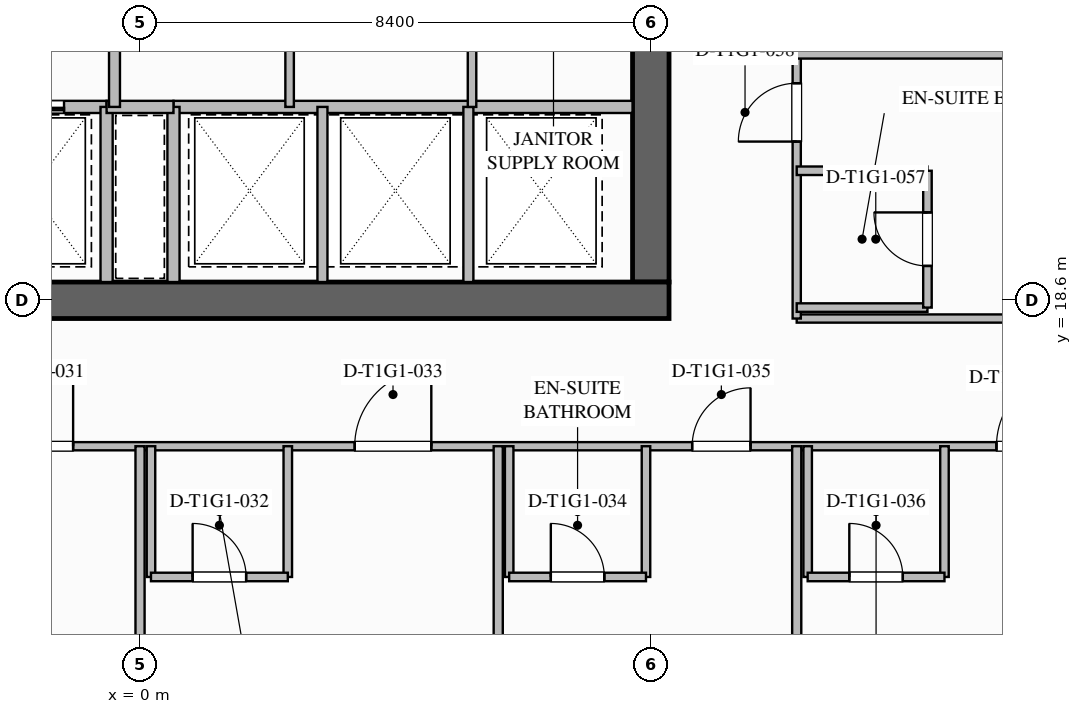
"""IFC4 building model, lengths in metres.
Left out: names, types, materials, properties, quantities, classifications, styles, units other than length and angle.
Written with IfcOpenShell. Run it as: python <this file> out.ifc"""

import sys

from ifc_helpers import new_model, si_unit, direction, frame, frame_2d, origin, place, context, subcontext, project, spatial, rectangle, extrude, element, fill, save


model = new_model("IFC4")
c1 = context("Model", 3, precision=1e-05, world=origin(), true_north=direction((0.0, 1.0)))
c2 = subcontext(c1, "Body", "Model", "MODEL_VIEW")
j1 = project(units=[si_unit("LENGTHUNIT", "METRE"), si_unit("PLANEANGLEUNIT", "RADIAN")], contexts=[c1])
p1 = place(None, origin())
s1 = spatial("IfcSite", under=j1, at=p1, CompositionType="ELEMENT")
p2 = place(p1, origin())
s2 = spatial("IfcBuilding", under=s1, at=p2, CompositionType="ELEMENT")
p3 = place(p2, frame((0.0, 0.0, 33.2)))
s3 = spatial("IfcBuildingStorey", under=s2, at=p3, CompositionType="ELEMENT", Elevation=33.2)
p4 = place(p3, frame((8.4, 35.1, 0.0), z_axis=(0.0, 0.0, 1.0), x_axis=(0.0, -1.0, 0.0)))
e1 = element("IfcWall", 1, at=p4, inside=s3, PredefinedType="SHEAR", context=c2, shape_type="SweptSolid", body=[
    extrude(rectangle(XDim=16.2, YDim=0.6, at=frame_2d((8.1, 0.0))), origin(), (0.0, 0.0, 1.0), 3.5),
])
p5 = place(p4, frame((3.08, 0.0, 0.0)))
e2 = element("IfcOpeningElement", 2, at=p5, cuts=e1, PredefinedType="OPENING", context=c2, shape_type="SweptSolid", body=[
    extrude(rectangle(XDim=1.12, YDim=2.1, at=frame_2d((0.56, 1.05))), frame((0.0, 0.31, 0.0), z_axis=(0.0, -1.0, 0.0), x_axis=(1.0, 0.0, 0.0)), (0.0, 0.0, 1.0), 0.62),
])
p6 = place(p3, frame((8.7, 18.6, 0.0), z_axis=(0.0, 0.0, 1.0), x_axis=(-1.0, 0.0, 0.0)))
e3 = element("IfcWall", 3, at=p6, inside=s3, PredefinedType="SHEAR", context=c2, shape_type="SweptSolid", body=[
    extrude(rectangle(XDim=17.4, YDim=0.6, at=frame_2d((8.7, 0.0))), origin(), (0.0, 0.0, 1.0), 3.5),
])
p7 = place(p3, frame((-0.55, 21.78, 0.0), z_axis=(0.0, 0.0, 1.0), x_axis=(-1.0, 0.0, 0.0)))
e4 = element("IfcWall", 4, at=p7, inside=s3, PredefinedType="SOLIDWALL", context=c2, shape_type="SweptSolid", body=[
    extrude(rectangle(XDim=7.55, YDim=0.2, at=frame_2d((3.775, 0.0))), origin(), (0.0, 0.0, 1.0), 3.24),
])
p8 = place(p7, frame((5.5, 0.0, 0.0)))
e5 = element("IfcOpeningElement", 5, at=p8, cuts=e4, PredefinedType="OPENING", context=c2, shape_type="SweptSolid", body=[
    extrude(rectangle(XDim=1.1, YDim=2.2, at=frame_2d((0.55, 1.1))), frame((0.0, 0.11, 0.0), z_axis=(0.0, -1.0, 0.0), x_axis=(1.0, 0.0, 0.0)), (0.0, 0.0, 1.0), 0.22),
])
p9 = place(p7, frame((3.1, 0.0, 0.0)))
e6 = element("IfcOpeningElement", 6, at=p9, cuts=e4, PredefinedType="OPENING", context=c2, shape_type="SweptSolid", body=[
    extrude(rectangle(XDim=1.1, YDim=2.2, at=frame_2d((0.55, 1.1))), frame((0.0, 0.11, 0.0), z_axis=(0.0, -1.0, 0.0), x_axis=(1.0, 0.0, 0.0)), (0.0, 0.0, 1.0), 0.22),
])
p10 = place(p7, frame((0.7, 0.0, 0.0)))
e7 = element("IfcOpeningElement", 7, at=p10, cuts=e4, PredefinedType="OPENING", context=c2, shape_type="SweptSolid", body=[
    extrude(rectangle(XDim=1.1, YDim=2.2, at=frame_2d((0.55, 1.1))), frame((0.0, 0.11, 0.0), z_axis=(0.0, -1.0, 0.0), x_axis=(1.0, 0.0, 0.0)), (0.0, 0.0, 1.0), 0.22),
])
p11 = place(p3, frame((-0.55, 18.9, 0.0), z_axis=(0.0, 0.0, 1.0), x_axis=(0.0, 1.0, 0.0)))
e8 = element("IfcWall", 8, at=p11, inside=s3, PredefinedType="SOLIDWALL", context=c2, shape_type="SweptSolid", body=[
    extrude(rectangle(XDim=2.88, YDim=0.2, at=frame_2d((1.44, 0.0))), origin(), (0.0, 0.0, 1.0), 3.24),
])
p12 = place(p3, frame((8.1, 21.78, 0.0), z_axis=(0.0, 0.0, 1.0), x_axis=(-1.0, 0.0, 0.0)))
e9 = element("IfcWall", 9, at=p12, inside=s3, PredefinedType="SOLIDWALL", context=c2, shape_type="SweptSolid", body=[
    extrude(rectangle(XDim=7.55, YDim=0.2, at=frame_2d((3.775, 0.0))), origin(), (0.0, 0.0, 1.0), 3.24),
])
p13 = place(p3, frame((0.55, 18.9, 0.0), z_axis=(0.0, 0.0, 1.0), x_axis=(0.0, 1.0, 0.0)))
e10 = element("IfcWall", 10, at=p13, inside=s3, PredefinedType="SOLIDWALL", context=c2, shape_type="SweptSolid", body=[
    extrude(rectangle(XDim=2.88, YDim=0.2, at=frame_2d((1.44, 0.0))), origin(), (0.0, 0.0, 1.0), 3.24),
])
for number, where, z_axis, x_axis in (
    (11, (3.0, 18.9, 0.0), (0.0, 0.0, 1.0), (0.0, 1.0, 0.0)),
    (12, (5.4, 18.9, 0.0), (0.0, 0.0, 1.0), (0.0, 1.0, 0.0)),
):
    element("IfcWall", number, at=place(p3, frame(where, z_axis=z_axis, x_axis=x_axis)), inside=s3, PredefinedType="PARTITIONING", context=c2, shape_type="SweptSolid", body=[
        extrude(rectangle(XDim=2.88, YDim=0.165, at=frame_2d((1.44, 0.0))), origin(), (0.0, 0.0, 1.0), 3.24),
    ])
p14 = place(p3, frame((-0.55, 21.78, 0.0), z_axis=(0.0, 0.0, 1.0), x_axis=(1.0, 0.0, 0.0)))
e13 = element("IfcWall", 13, at=p14, inside=s3, PredefinedType="SOLIDWALL", context=c2, shape_type="SweptSolid", body=[
    extrude(rectangle(XDim=1.1, YDim=0.2, at=frame_2d((0.55, 0.0))), origin(), (0.0, 0.0, 1.0), 3.24),
])
p15 = place(p3, frame((-0.42, 21.78, 0.0), z_axis=(0.0, 0.0, 1.0), x_axis=(0.0, 1.0, 0.0)))
e14 = element("IfcWall", 14, at=p15, inside=s3, PredefinedType="SOLIDWALL", context=c2, shape_type="SweptSolid", body=[
    extrude(rectangle(XDim=3.26, YDim=0.18, at=frame_2d((1.63, 0.0))), origin(), (0.0, 0.0, 1.0), 3.24),
])
p16 = place(p15, frame((1.1, 0.0, 0.0)))
e15 = element("IfcOpeningElement", 15, at=p16, cuts=e14, PredefinedType="OPENING", context=c2, shape_type="SweptSolid", body=[
    extrude(rectangle(XDim=1.0, YDim=2.1, at=frame_2d((0.5, 1.05))), frame((0.0, 0.1, 0.0), z_axis=(0.0, -1.0, 0.0), x_axis=(1.0, 0.0, 0.0)), (0.0, 0.0, 1.0), 0.2),
])
p17 = place(p3, frame((2.46, 21.78, 0.0), z_axis=(0.0, 0.0, 1.0), x_axis=(0.0, 1.0, 0.0)))
e16 = element("IfcWall", 16, at=p17, inside=s3, PredefinedType="PLUMBINGWALL", context=c2, shape_type="SweptSolid", body=[
    extrude(rectangle(XDim=3.26, YDim=0.14, at=frame_2d((1.63, 0.0))), origin(), (0.0, 0.0, 1.0), 3.24),
])
p18 = place(p17, frame((1.0, 0.0, 0.0)))
e17 = element("IfcOpeningElement", 17, at=p18, cuts=e16, PredefinedType="OPENING", context=c2, shape_type="SweptSolid", body=[
    extrude(rectangle(XDim=0.92, YDim=2.1, at=frame_2d((0.46, 1.05))), frame((0.0, 0.08, 0.0), z_axis=(0.0, -1.0, 0.0), x_axis=(1.0, 0.0, 0.0)), (0.0, 0.0, 1.0), 0.16),
])
p19 = place(p3, frame((5.46, 21.78, 0.0), z_axis=(0.0, 0.0, 1.0), x_axis=(0.0, 1.0, 0.0)))
e18 = element("IfcWall", 18, at=p19, inside=s3, PredefinedType="PLUMBINGWALL", context=c2, shape_type="SweptSolid", body=[
    extrude(rectangle(XDim=3.26, YDim=0.14, at=frame_2d((1.63, 0.0))), origin(), (0.0, 0.0, 1.0), 3.24),
])
p20 = place(p19, frame((1.0, 0.0, 0.0)))
e19 = element("IfcOpeningElement", 19, at=p20, cuts=e18, PredefinedType="OPENING", context=c2, shape_type="SweptSolid", body=[
    extrude(rectangle(XDim=0.92, YDim=2.1, at=frame_2d((0.46, 1.05))), frame((0.0, 0.08, 0.0), z_axis=(0.0, -1.0, 0.0), x_axis=(1.0, 0.0, 0.0)), (0.0, 0.0, 1.0), 0.16),
])
p21 = place(p3, frame((-16.2, 16.2, 0.0), z_axis=(0.0, 0.0, 1.0), x_axis=(1.0, 0.0, 0.0)))
e20 = element("IfcWall", 20, at=p21, inside=s3, PredefinedType="PARTITIONING", context=c2, shape_type="SweptSolid", body=[
    extrude(rectangle(XDim=32.4, YDim=0.135, at=frame_2d((16.2, 0.0))), origin(), (0.0, 0.0, 1.0), 3.24),
])
p22 = place(p21, frame((3.285, 0.0, 0.0)))
e21 = element("IfcOpeningElement", 21, at=p22, cuts=e20, PredefinedType="OPENING", context=c2, shape_type="SweptSolid", body=[
    extrude(rectangle(XDim=1.26, YDim=2.2, at=frame_2d((0.63, 1.1))), frame((0.0, 0.077, 0.0), z_axis=(0.0, -1.0, 0.0), x_axis=(1.0, 0.0, 0.0)), (0.0, 0.0, 1.0), 0.155),
])
p23 = place(p21, frame((8.59, 0.0, 0.0)))
e22 = element("IfcOpeningElement", 22, at=p23, cuts=e20, PredefinedType="OPENING", context=c2, shape_type="SweptSolid", body=[
    extrude(rectangle(XDim=0.96, YDim=2.15, at=frame_2d((0.48, 1.075))), frame((0.0, 0.077, 0.0), z_axis=(0.0, -1.0, 0.0), x_axis=(1.0, 0.0, 0.0)), (0.0, 0.0, 1.0), 0.155),
])
p24 = place(p21, frame((13.84, 0.0, 0.0)))
e23 = element("IfcOpeningElement", 23, at=p24, cuts=e20, PredefinedType="OPENING", context=c2, shape_type="SweptSolid", body=[
    extrude(rectangle(XDim=1.26, YDim=2.2, at=frame_2d((0.63, 1.1))), frame((0.0, 0.077, 0.0), z_axis=(0.0, -1.0, 0.0), x_axis=(1.0, 0.0, 0.0)), (0.0, 0.0, 1.0), 0.155),
])
p25 = place(p21, frame((19.73, 0.0, 0.0)))
e24 = element("IfcOpeningElement", 24, at=p25, cuts=e20, PredefinedType="OPENING", context=c2, shape_type="SweptSolid", body=[
    extrude(rectangle(XDim=1.26, YDim=2.2, at=frame_2d((0.63, 1.1))), frame((0.0, 0.077, 0.0), z_axis=(0.0, -1.0, 0.0), x_axis=(1.0, 0.0, 0.0)), (0.0, 0.0, 1.0), 0.155),
])
p26 = place(p21, frame((25.281, 0.0, 0.0)))
e25 = element("IfcOpeningElement", 25, at=p26, cuts=e20, PredefinedType="OPENING", context=c2, shape_type="SweptSolid", body=[
    extrude(rectangle(XDim=0.96, YDim=2.15, at=frame_2d((0.48, 1.075))), frame((0.0, 0.077, 0.0), z_axis=(0.0, -1.0, 0.0), x_axis=(1.0, 0.0, 0.0)), (0.0, 0.0, 1.0), 0.155),
])
p27 = place(p21, frame((30.285, 0.0, 0.0)))
e26 = element("IfcOpeningElement", 26, at=p27, cuts=e20, PredefinedType="OPENING", context=c2, shape_type="SweptSolid", body=[
    extrude(rectangle(XDim=1.26, YDim=2.2, at=frame_2d((0.63, 1.1))), frame((0.0, 0.077, 0.0), z_axis=(0.0, -1.0, 0.0), x_axis=(1.0, 0.0, 0.0)), (0.0, 0.0, 1.0), 0.155),
])
p28 = place(p3, frame((10.8, 18.3, 0.0), z_axis=(0.0, 0.0, 1.0), x_axis=(1.0, 0.0, 0.0)))
e27 = element("IfcWall", 27, at=p28, inside=s3, PredefinedType="PARTITIONING", context=c2, shape_type="SweptSolid", body=[
    extrude(rectangle(XDim=5.4, YDim=0.135, at=frame_2d((2.7, 0.0))), origin(), (0.0, 0.0, 1.0), 3.24),
])
p29 = place(p3, frame((10.8, 18.3, 0.0), z_axis=(0.0, 0.0, 1.0), x_axis=(0.0, 1.0, 0.0)))
e28 = element("IfcWall", 28, at=p29, inside=s3, PredefinedType="PARTITIONING", context=c2, shape_type="SweptSolid", body=[
    extrude(rectangle(XDim=17.4, YDim=0.135, at=frame_2d((8.7, 0.0))), origin(), (0.0, 0.0, 1.0), 3.24),
])
p30 = place(p29, frame((2.91, 0.0, 0.0)))
e29 = element("IfcOpeningElement", 29, at=p30, cuts=e28, PredefinedType="OPENING", context=c2, shape_type="SweptSolid", body=[
    extrude(rectangle(XDim=0.96, YDim=2.15, at=frame_2d((0.48, 1.075))), frame((0.0, 0.077, 0.0), z_axis=(0.0, -1.0, 0.0), x_axis=(1.0, 0.0, 0.0)), (0.0, 0.0, 1.0), 0.155),
])
p31 = place(p29, frame((6.015, 0.0, 0.0)))
e30 = element("IfcOpeningElement", 30, at=p31, cuts=e28, PredefinedType="OPENING", context=c2, shape_type="SweptSolid", body=[
    extrude(rectangle(XDim=1.02, YDim=2.15, at=frame_2d((0.51, 1.075))), frame((0.0, 0.077, 0.0), z_axis=(0.0, -1.0, 0.0), x_axis=(1.0, 0.0, 0.0)), (0.0, 0.0, 1.0), 0.155),
])
p32 = place(p29, frame((11.61, 0.0, 0.0)))
e31 = element("IfcOpeningElement", 31, at=p32, cuts=e28, PredefinedType="OPENING", context=c2, shape_type="SweptSolid", body=[
    extrude(rectangle(XDim=0.96, YDim=2.15, at=frame_2d((0.48, 1.075))), frame((0.0, 0.077, 0.0), z_axis=(0.0, -1.0, 0.0), x_axis=(1.0, 0.0, 0.0)), (0.0, 0.0, 1.0), 0.155),
])
p33 = place(p29, frame((15.96, 0.0, 0.0)))
e32 = element("IfcOpeningElement", 32, at=p33, cuts=e28, PredefinedType="OPENING", context=c2, shape_type="SweptSolid", body=[
    extrude(rectangle(XDim=0.96, YDim=2.15, at=frame_2d((0.48, 1.075))), frame((0.0, 0.077, 0.0), z_axis=(0.0, -1.0, 0.0), x_axis=(1.0, 0.0, 0.0)), (0.0, 0.0, 1.0), 0.155),
])
p34 = place(p3, frame((0.0, 0.8, 0.0), z_axis=(0.0, 0.0, 1.0), x_axis=(0.0, 1.0, 0.0)))
e33 = element("IfcWall", 33, at=p34, inside=s3, PredefinedType="PARTITIONING", context=c2, shape_type="SweptSolid", body=[
    extrude(rectangle(XDim=15.4, YDim=0.15, at=frame_2d((7.7, 0.0))), origin(), (0.0, 0.0, 1.0), 2.298),
])
p35 = place(p3, frame((0.18, 16.2, 0.0), z_axis=(0.0, 0.0, 1.0), x_axis=(0.0, -1.0, 0.0)))
e34 = element("IfcWall", 34, at=p35, inside=s3, PredefinedType="PLUMBINGWALL", context=c2, shape_type="SweptSolid", body=[
    extrude(rectangle(XDim=2.15, YDim=0.14, at=frame_2d((1.075, 0.0))), origin(), (0.0, 0.0, 1.0), 2.617),
])
p36 = place(p3, frame((2.43, 16.2, 0.0), z_axis=(0.0, 0.0, 1.0), x_axis=(0.0, -1.0, 0.0)))
e35 = element("IfcWall", 35, at=p36, inside=s3, PredefinedType="PLUMBINGWALL", context=c2, shape_type="SweptSolid", body=[
    extrude(rectangle(XDim=2.15, YDim=0.14, at=frame_2d((1.075, 0.0))), origin(), (0.0, 0.0, 1.0), 3.24),
])
p37 = place(p3, frame((0.18, 14.05, 0.0), z_axis=(0.0, 0.0, 1.0), x_axis=(1.0, 0.0, 0.0)))
e36 = element("IfcWall", 36, at=p37, inside=s3, PredefinedType="PLUMBINGWALL", context=c2, shape_type="SweptSolid", body=[
    extrude(rectangle(XDim=2.25, YDim=0.14, at=frame_2d((1.125, 0.0))), origin(), (0.0, 0.0, 1.0), 3.24),
])
p38 = place(p37, frame((0.685, 0.0, 0.0)))
e37 = element("IfcOpeningElement", 37, at=p38, cuts=e36, PredefinedType="OPENING", context=c2, shape_type="SweptSolid", body=[
    extrude(rectangle(XDim=0.88, YDim=2.1, at=frame_2d((0.44, 1.05))), frame((0.0, 0.08, 0.0), z_axis=(0.0, -1.0, 0.0), x_axis=(1.0, 0.0, 0.0)), (0.0, 0.0, 1.0), 0.16),
])
p39 = place(p3, frame((5.891, 0.12, 0.0), z_axis=(0.0, 0.0, 1.0), x_axis=(0.0, 1.0, 0.0)))
e38 = element("IfcWall", 38, at=p39, inside=s3, PredefinedType="PARTITIONING", context=c2, shape_type="SweptSolid", body=[
    extrude(rectangle(XDim=16.08, YDim=0.15, at=frame_2d((8.04, 0.0))), origin(), (0.0, 0.0, 1.0), 3.24),
])
p40 = place(p3, frame((6.071, 16.2, 0.0), z_axis=(0.0, 0.0, 1.0), x_axis=(0.0, -1.0, 0.0)))
e39 = element("IfcWall", 39, at=p40, inside=s3, PredefinedType="PLUMBINGWALL", context=c2, shape_type="SweptSolid", body=[
    extrude(rectangle(XDim=2.15, YDim=0.14, at=frame_2d((1.075, 0.0))), origin(), (0.0, 0.0, 1.0), 3.24),
])
p41 = place(p3, frame((8.321, 16.2, 0.0), z_axis=(0.0, 0.0, 1.0), x_axis=(0.0, -1.0, 0.0)))
e40 = element("IfcWall", 40, at=p41, inside=s3, PredefinedType="PLUMBINGWALL", context=c2, shape_type="SweptSolid", body=[
    extrude(rectangle(XDim=2.15, YDim=0.14, at=frame_2d((1.075, 0.0))), origin(), (0.0, 0.0, 1.0), 2.617),
])
p42 = place(p3, frame((6.071, 14.05, 0.0), z_axis=(0.0, 0.0, 1.0), x_axis=(1.0, 0.0, 0.0)))
e41 = element("IfcWall", 41, at=p42, inside=s3, PredefinedType="PLUMBINGWALL", context=c2, shape_type="SweptSolid", body=[
    extrude(rectangle(XDim=2.25, YDim=0.14, at=frame_2d((1.125, 0.0))), origin(), (0.0, 0.0, 1.0), 3.24),
])
p43 = place(p42, frame((0.685, 0.0, 0.0)))
e42 = element("IfcOpeningElement", 42, at=p43, cuts=e41, PredefinedType="OPENING", context=c2, shape_type="SweptSolid", body=[
    extrude(rectangle(XDim=0.88, YDim=2.1, at=frame_2d((0.44, 1.05))), frame((0.0, 0.08, 0.0), z_axis=(0.0, -1.0, 0.0), x_axis=(1.0, 0.0, 0.0)), (0.0, 0.0, 1.0), 0.16),
])
p44 = place(p3, frame((10.8, 0.12, 0.0), z_axis=(0.0, 0.0, 1.0), x_axis=(0.0, 1.0, 0.0)))
e43 = element("IfcWall", 43, at=p44, inside=s3, PredefinedType="PARTITIONING", context=c2, shape_type="SweptSolid", body=[
    extrude(rectangle(XDim=16.08, YDim=0.15, at=frame_2d((8.04, 0.0))), origin(), (0.0, 0.0, 1.0), 3.24),
])
for number, where, z_axis, x_axis in (
    (44, (10.98, 16.2, 0.0), (0.0, 0.0, 1.0), (0.0, -1.0, 0.0)),
    (45, (13.23, 16.2, 0.0), (0.0, 0.0, 1.0), (0.0, -1.0, 0.0)),
):
    element("IfcWall", number, at=place(p3, frame(where, z_axis=z_axis, x_axis=x_axis)), inside=s3, PredefinedType="PLUMBINGWALL", context=c2, shape_type="SweptSolid", body=[
        extrude(rectangle(XDim=2.15, YDim=0.14, at=frame_2d((1.075, 0.0))), origin(), (0.0, 0.0, 1.0), 3.24),
    ])
p45 = place(p3, frame((10.98, 14.05, 0.0), z_axis=(0.0, 0.0, 1.0), x_axis=(1.0, 0.0, 0.0)))
e46 = element("IfcWall", 46, at=p45, inside=s3, PredefinedType="PLUMBINGWALL", context=c2, shape_type="SweptSolid", body=[
    extrude(rectangle(XDim=2.25, YDim=0.14, at=frame_2d((1.125, 0.0))), origin(), (0.0, 0.0, 1.0), 3.24),
])
p46 = place(p45, frame((0.685, 0.0, 0.0)))
e47 = element("IfcOpeningElement", 47, at=p46, cuts=e46, PredefinedType="OPENING", context=c2, shape_type="SweptSolid", body=[
    extrude(rectangle(XDim=0.88, YDim=2.1, at=frame_2d((0.44, 1.05))), frame((0.0, 0.08, 0.0), z_axis=(0.0, -1.0, 0.0), x_axis=(1.0, 0.0, 0.0)), (0.0, 0.0, 1.0), 0.16),
])
p47 = place(p3, frame((10.8, 18.48, 0.0), z_axis=(0.0, 0.0, 1.0), x_axis=(1.0, 0.0, 0.0)))
e48 = element("IfcWall", 48, at=p47, inside=s3, PredefinedType="PLUMBINGWALL", context=c2, shape_type="SweptSolid", body=[
    extrude(rectangle(XDim=2.15, YDim=0.14, at=frame_2d((1.075, 0.0))), origin(), (0.0, 0.0, 1.0), 2.617),
])
p48 = place(p3, frame((10.8, 20.73, 0.0), z_axis=(0.0, 0.0, 1.0), x_axis=(1.0, 0.0, 0.0)))
e49 = element("IfcWall", 49, at=p48, inside=s3, PredefinedType="PLUMBINGWALL", context=c2, shape_type="SweptSolid", body=[
    extrude(rectangle(XDim=2.15, YDim=0.14, at=frame_2d((1.075, 0.0))), origin(), (0.0, 0.0, 1.0), 3.24),
])
p49 = place(p3, frame((12.95, 18.48, 0.0), z_axis=(0.0, 0.0, 1.0), x_axis=(0.0, 1.0, 0.0)))
e50 = element("IfcWall", 50, at=p49, inside=s3, PredefinedType="PLUMBINGWALL", context=c2, shape_type="SweptSolid", body=[
    extrude(rectangle(XDim=2.25, YDim=0.14, at=frame_2d((1.125, 0.0))), origin(), (0.0, 0.0, 1.0), 3.24),
])
p50 = place(p49, frame((0.685, 0.0, 0.0)))
e51 = element("IfcOpeningElement", 51, at=p50, cuts=e50, PredefinedType="OPENING", context=c2, shape_type="SweptSolid", body=[
    extrude(rectangle(XDim=0.88, YDim=2.1, at=frame_2d((0.44, 1.05))), frame((0.0, 0.08, 0.0), z_axis=(0.0, -1.0, 0.0), x_axis=(1.0, 0.0, 0.0)), (0.0, 0.0, 1.0), 0.16),
])
p51 = place(p3, frame((10.8, 22.65, 0.0), z_axis=(0.0, 0.0, 1.0), x_axis=(1.0, 0.0, 0.0)))
e52 = element("IfcWall", 52, at=p51, inside=s3, PredefinedType="PARTITIONING", context=c2, shape_type="SweptSolid", body=[
    extrude(rectangle(XDim=15.4, YDim=0.15, at=frame_2d((7.7, 0.0))), origin(), (0.0, 0.0, 1.0), 3.24),
])
p52 = place(p10, origin())
e53 = element("IfcDoor", 53, at=p52, inside=s3, OperationType="SLIDING_TO_LEFT", PredefinedType="DOOR", context=c2, shape_type="SweptSolid", body=[
    extrude(rectangle(XDim=1.1, YDim=2.2, at=frame_2d((0.55, 1.1))), frame((0.0, 0.025, 0.0), z_axis=(0.0, -1.0, 0.0), x_axis=(1.0, 0.0, 0.0)), (0.0, 0.0, 1.0), 0.05),
])
fill(e7, e53)
p53 = place(p24, origin())
e54 = element("IfcDoor", 54, at=p53, inside=s3, OperationType="SINGLE_SWING_RIGHT", PredefinedType="DOOR", context=c2, shape_type="SweptSolid", body=[
    extrude(rectangle(XDim=1.26, YDim=2.2, at=frame_2d((0.63, 1.1))), frame((0.0, 0.025, 0.0), z_axis=(0.0, -1.0, 0.0), x_axis=(1.0, 0.0, 0.0)), (0.0, 0.0, 1.0), 0.05),
])
fill(e23, e54)
p54 = place(p38, origin())
e55 = element("IfcDoor", 55, at=p54, inside=s3, OperationType="SINGLE_SWING_LEFT", PredefinedType="DOOR", context=c2, shape_type="SweptSolid", body=[
    extrude(rectangle(XDim=0.88, YDim=2.1, at=frame_2d((0.44, 1.05))), frame((0.0, 0.025, 0.0), z_axis=(0.0, -1.0, 0.0), x_axis=(1.0, 0.0, 0.0)), (0.0, 0.0, 1.0), 0.05),
])
fill(e37, e55)
p55 = place(p25, origin())
e56 = element("IfcDoor", 56, at=p55, inside=s3, OperationType="SINGLE_SWING_RIGHT", PredefinedType="DOOR", context=c2, shape_type="SweptSolid", body=[
    extrude(rectangle(XDim=1.26, YDim=2.2, at=frame_2d((0.63, 1.1))), frame((0.0, 0.025, 0.0), z_axis=(0.0, -1.0, 0.0), x_axis=(1.0, 0.0, 0.0)), (0.0, 0.0, 1.0), 0.05),
])
fill(e24, e56)
p56 = place(p43, origin())
e57 = element("IfcDoor", 57, at=p56, inside=s3, OperationType="SINGLE_SWING_LEFT", PredefinedType="DOOR", context=c2, shape_type="SweptSolid", body=[
    extrude(rectangle(XDim=0.88, YDim=2.1, at=frame_2d((0.44, 1.05))), frame((0.0, 0.025, 0.0), z_axis=(0.0, -1.0, 0.0), x_axis=(1.0, 0.0, 0.0)), (0.0, 0.0, 1.0), 0.05),
])
fill(e42, e57)
p57 = place(p26, origin())
e58 = element("IfcDoor", 58, at=p57, inside=s3, OperationType="SINGLE_SWING_RIGHT", PredefinedType="DOOR", context=c2, shape_type="SweptSolid", body=[
    extrude(rectangle(XDim=0.96, YDim=2.15, at=frame_2d((0.48, 1.075))), frame((0.0, 0.025, 0.0), z_axis=(0.0, -1.0, 0.0), x_axis=(1.0, 0.0, 0.0)), (0.0, 0.0, 1.0), 0.05),
])
fill(e25, e58)
p58 = place(p46, origin())
e59 = element("IfcDoor", 59, at=p58, inside=s3, OperationType="SINGLE_SWING_LEFT", PredefinedType="DOOR", context=c2, shape_type="SweptSolid", body=[
    extrude(rectangle(XDim=0.88, YDim=2.1, at=frame_2d((0.44, 1.05))), frame((0.0, 0.025, 0.0), z_axis=(0.0, -1.0, 0.0), x_axis=(1.0, 0.0, 0.0)), (0.0, 0.0, 1.0), 0.05),
])
fill(e47, e59)
p59 = place(p27, origin())
e60 = element("IfcDoor", 60, at=p59, inside=s3, OperationType="SINGLE_SWING_RIGHT", PredefinedType="DOOR", context=c2, shape_type="SweptSolid", body=[
    extrude(rectangle(XDim=1.26, YDim=2.2, at=frame_2d((0.63, 1.1))), frame((0.0, 0.025, 0.0), z_axis=(0.0, -1.0, 0.0), x_axis=(1.0, 0.0, 0.0)), (0.0, 0.0, 1.0), 0.05),
])
fill(e26, e60)
p60 = place(p50, origin())
e61 = element("IfcDoor", 61, at=p60, inside=s3, OperationType="SINGLE_SWING_RIGHT", PredefinedType="DOOR", context=c2, shape_type="SweptSolid", body=[
    extrude(rectangle(XDim=0.88, YDim=2.1, at=frame_2d((0.44, 1.05))), frame((0.0, 0.025, 0.0), z_axis=(0.0, -1.0, 0.0), x_axis=(1.0, 0.0, 0.0)), (0.0, 0.0, 1.0), 0.05),
])
fill(e51, e61)
p61 = place(p30, origin())
e62 = element("IfcDoor", 62, at=p61, inside=s3, OperationType="SINGLE_SWING_LEFT", PredefinedType="DOOR", context=c2, shape_type="SweptSolid", body=[
    extrude(rectangle(XDim=0.96, YDim=2.15, at=frame_2d((0.48, 1.075))), frame((0.0, 0.025, 0.0), z_axis=(0.0, -1.0, 0.0), x_axis=(1.0, 0.0, 0.0)), (0.0, 0.0, 1.0), 0.05),
])
fill(e29, e62)
save(model, sys.argv[1])
